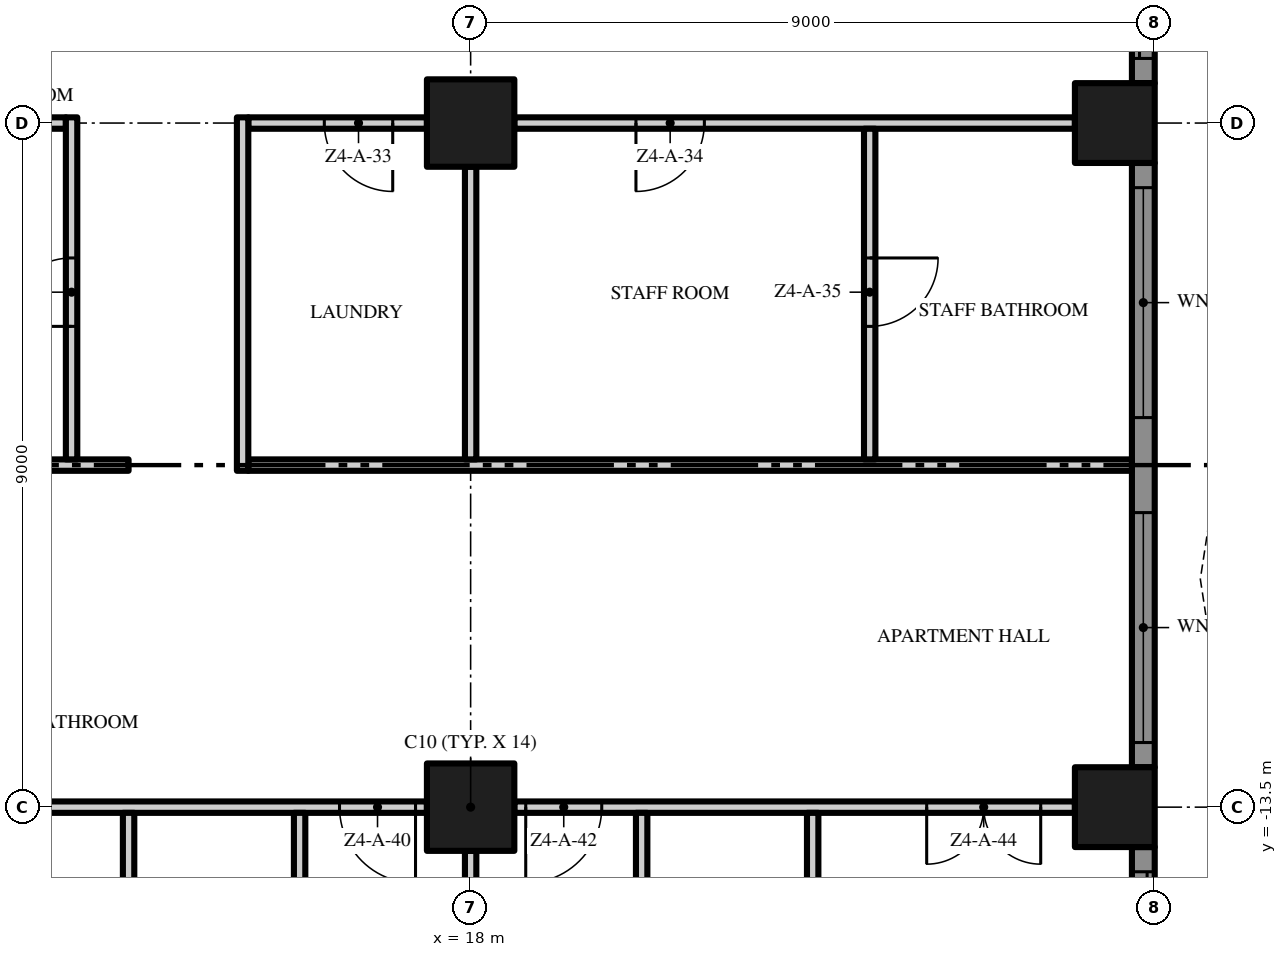
"""IFC4 building model, lengths in metres.
Left out: names, types, materials, properties, quantities, classifications, styles, units other than length and angle.
Written with IfcOpenShell. Run it as: python <this file> out.ifc"""

import sys

from ifc_helpers import new_model, si_unit, direction, frame, frame_2d, origin, origin_2d, place, context, subcontext, project, spatial, polyline, rectangle, outline, extrude, element, fill, save


model = new_model("IFC4")
c1 = context("Model", 3, precision=1e-05, world=origin(), true_north=direction((0.0, 1.0)))
c2 = subcontext(c1, "Body", "Model", "MODEL_VIEW")
j1 = project(units=[si_unit("LENGTHUNIT", "METRE"), si_unit("PLANEANGLEUNIT", "RADIAN")], contexts=[c1])
p1 = place(None, origin())
s1 = spatial("IfcSite", under=j1, at=p1, CompositionType="ELEMENT")
p2 = place(p1, origin())
s2 = spatial("IfcBuilding", under=s1, at=p2, CompositionType="ELEMENT")
p3 = place(p2, frame((0.0, 0.0, 188.2)))
s3 = spatial("IfcBuildingStorey", under=s2, at=p3, CompositionType="ELEMENT", Elevation=188.2)
for number, where, z_axis, x_axis in (
    (1, (18.0, -13.5, 0.0), (0.0, 0.0, 1.0), (1.0, 0.0, 0.0)),
    (2, (18.0, -4.5, 0.0), (0.0, 0.0, 1.0), (1.0, 0.0, 0.0)),
):
    element("IfcColumn", number, at=place(p3, frame(where, z_axis=z_axis, x_axis=x_axis)), inside=s3, PredefinedType="COLUMN", context=c2, shape_type="SweptSolid", body=[
        extrude(rectangle(XDim=1.15, YDim=1.15, at=origin_2d()), origin(), (0.0, 0.0, 1.0), 3.5),
    ])
for number, where, z_axis, x_axis in (
    (3, (26.475, -13.5, 0.0), (0.0, 0.0, 1.0), (1.0, 0.0, 0.0)),
    (4, (26.475, -4.5, 0.0), (0.0, 0.0, 1.0), (1.0, 0.0, 0.0)),
):
    element("IfcColumn", number, at=place(p3, frame(where, z_axis=z_axis, x_axis=x_axis)), inside=s3, PredefinedType="COLUMN", context=c2, shape_type="SweptSolid", body=[
        extrude(rectangle(XDim=1.05, YDim=1.05, at=origin_2d()), origin(), (0.0, 0.0, 1.0), 3.5),
    ])
p4 = place(p3, frame((26.85, -14.025, 0.0), z_axis=(0.0, 0.0, 1.0), x_axis=(0.0, -1.0, 0.0)))
e5 = element("IfcWall", 5, at=p4, inside=s3, PredefinedType="SOLIDWALL", context=c2, shape_type="SweptSolid", body=[
    extrude(rectangle(XDim=3.675, YDim=0.3, at=frame_2d((1.837, 0.0))), origin(), (0.0, 0.0, 1.0), 3.5),
])
p5 = place(p4, frame((0.325, 0.0, 0.0)))
e6 = element("IfcOpeningElement", 6, at=p5, cuts=e5, PredefinedType="OPENING", context=c2, shape_type="SweptSolid", body=[
    extrude(rectangle(XDim=3.025, YDim=2.4, at=frame_2d((1.512, 1.2))), frame((0.0, 0.16, 0.0), z_axis=(0.0, -1.0, 0.0), x_axis=(1.0, 0.0, 0.0)), (0.0, 0.0, 1.0), 0.32),
])
p6 = place(p3, frame((26.85, -5.025, 0.0), z_axis=(0.0, 0.0, 1.0), x_axis=(0.0, -1.0, 0.0)))
e7 = element("IfcWall", 7, at=p6, inside=s3, PredefinedType="SOLIDWALL", context=c2, shape_type="SweptSolid", body=[
    extrude(rectangle(XDim=7.95, YDim=0.3, at=frame_2d((3.975, 0.0))), origin(), (0.0, 0.0, 1.0), 3.5),
])
p7 = place(p6, frame((4.6, 0.0, 0.45)))
e8 = element("IfcOpeningElement", 8, at=p7, cuts=e7, PredefinedType="OPENING", context=c2, shape_type="SweptSolid", body=[
    extrude(rectangle(XDim=3.025, YDim=2.65, at=frame_2d((1.512, 1.325))), frame((0.0, 0.16, 0.0), z_axis=(0.0, -1.0, 0.0), x_axis=(1.0, 0.0, 0.0)), (0.0, 0.0, 1.0), 0.32),
])
p8 = place(p6, frame((0.325, 0.0, 0.45)))
e9 = element("IfcOpeningElement", 9, at=p8, cuts=e7, PredefinedType="OPENING", context=c2, shape_type="SweptSolid", body=[
    extrude(rectangle(XDim=3.025, YDim=2.65, at=frame_2d((1.512, 1.325))), frame((0.0, 0.16, 0.0), z_axis=(0.0, -1.0, 0.0), x_axis=(1.0, 0.0, 0.0)), (0.0, 0.0, 1.0), 0.32),
])
p9 = place(p3, frame((26.85, 3.975, 0.0), z_axis=(0.0, 0.0, 1.0), x_axis=(0.0, -1.0, 0.0)))
e10 = element("IfcWall", 10, at=p9, inside=s3, PredefinedType="SOLIDWALL", context=c2, shape_type="SweptSolid", body=[
    extrude(rectangle(XDim=7.95, YDim=0.3, at=frame_2d((3.975, 0.0))), origin(), (0.0, 0.0, 1.0), 3.5),
])
p10 = place(p9, frame((4.6, 0.0, 0.0)))
e11 = element("IfcOpeningElement", 11, at=p10, cuts=e10, PredefinedType="OPENING", context=c2, shape_type="SweptSolid", body=[
    extrude(rectangle(XDim=3.025, YDim=2.4, at=frame_2d((1.512, 1.2))), frame((0.0, 0.16, 0.0), z_axis=(0.0, -1.0, 0.0), x_axis=(1.0, 0.0, 0.0)), (0.0, 0.0, 1.0), 0.32),
])
p11 = place(p9, frame((0.325, 0.0, 0.45)))
e12 = element("IfcOpeningElement", 12, at=p11, cuts=e10, PredefinedType="OPENING", context=c2, shape_type="SweptSolid", body=[
    extrude(rectangle(XDim=3.025, YDim=2.65, at=frame_2d((1.512, 1.325))), frame((0.0, 0.16, 0.0), z_axis=(0.0, -1.0, 0.0), x_axis=(1.0, 0.0, 0.0)), (0.0, 0.0, 1.0), 0.32),
])
p12 = place(p3, origin())
e13 = element("IfcWall", 13, at=p12, inside=s3, PredefinedType="USERDEFINED", context=c2, shape_type="SweptSolid", body=[
    extrude(outline(polyline([(30.0, -18.0), (29.771, -16.5), (29.171, -15.0), (28.429, -13.5), (27.829, -12.0), (27.6, -10.5), (27.829, -9.0), (28.429, -7.5), (29.171, -6.0), (29.771, -4.5), (30.0, -3.0), (29.771, -1.5), (29.171, 0.0), (28.429, 1.5), (27.829, 3.0), (27.6, 4.5), (27.829, 6.0), (28.429, 7.5), (29.171, 9.0), (29.771, 10.5), (30.0, 12.0), (29.771, 13.5), (29.171, 15.0), (28.429, 16.5), (27.829, 18.0), (27.597, 17.907), (28.201, 16.398), (28.942, 14.898), (29.528, 13.434), (29.747, 12.0), (29.528, 10.566), (28.942, 9.102), (28.201, 7.602), (27.586, 6.066), (27.347, 4.5), (27.586, 2.934), (28.201, 1.398), (28.942, -0.102), (29.528, -1.566), (29.747, -3.0), (29.528, -4.434), (28.942, -5.898), (28.201, -7.398), (27.586, -8.934), (27.347, -10.5), (27.586, -12.066), (28.201, -13.602), (28.942, -15.102), (29.528, -16.566), (29.753, -18.038), (30.0, -18.0)])), origin(), (0.0, 0.0, 1.0), 0.9),
])
p13 = place(p3, frame((17.425, -13.5, 0.0), z_axis=(0.0, 0.0, 1.0), x_axis=(-1.0, 0.0, 0.0)))
e14 = element("IfcWall", 14, at=p13, inside=s3, PredefinedType="PARTITIONING", context=c2, shape_type="SweptSolid", body=[
    extrude(rectangle(XDim=7.85, YDim=0.15, at=frame_2d((3.925, 0.0))), origin(), (0.0, 0.0, 1.0), 3.5),
])
p14 = place(p13, frame((6.7, 0.0, 0.0)))
e15 = element("IfcOpeningElement", 15, at=p14, cuts=e14, PredefinedType="OPENING", context=c2, shape_type="SweptSolid", body=[
    extrude(rectangle(XDim=1.0, YDim=2.4, at=frame_2d((0.5, 1.2))), frame((0.0, 0.085, 0.0), z_axis=(0.0, -1.0, 0.0), x_axis=(1.0, 0.0, 0.0)), (0.0, 0.0, 1.0), 0.17),
])
p15 = place(p13, frame((0.15, 0.0, 0.0)))
e16 = element("IfcOpeningElement", 16, at=p15, cuts=e14, PredefinedType="OPENING", context=c2, shape_type="SweptSolid", body=[
    extrude(rectangle(XDim=1.0, YDim=2.4, at=frame_2d((0.5, 1.2))), frame((0.0, 0.085, 0.0), z_axis=(0.0, -1.0, 0.0), x_axis=(1.0, 0.0, 0.0)), (0.0, 0.0, 1.0), 0.17),
])
p16 = place(p3, frame((25.95, -13.5, 0.0), z_axis=(0.0, 0.0, 1.0), x_axis=(-1.0, 0.0, 0.0)))
e17 = element("IfcWall", 17, at=p16, inside=s3, PredefinedType="PARTITIONING", context=c2, shape_type="SweptSolid", body=[
    extrude(rectangle(XDim=7.375, YDim=0.15, at=frame_2d((3.688, 0.0))), origin(), (0.0, 0.0, 1.0), 3.5),
])
p17 = place(p16, frame((6.225, 0.0, 0.0)))
e18 = element("IfcOpeningElement", 18, at=p17, cuts=e17, PredefinedType="OPENING", context=c2, shape_type="SweptSolid", body=[
    extrude(rectangle(XDim=1.0, YDim=2.4, at=frame_2d((0.5, 1.2))), frame((0.0, 0.085, 0.0), z_axis=(0.0, -1.0, 0.0), x_axis=(1.0, 0.0, 0.0)), (0.0, 0.0, 1.0), 0.17),
])
p18 = place(p16, frame((0.45, 0.0, 0.0)))
e19 = element("IfcOpeningElement", 19, at=p18, cuts=e17, PredefinedType="OPENING", context=c2, shape_type="SweptSolid", body=[
    extrude(rectangle(XDim=1.5, YDim=2.4, at=frame_2d((0.75, 1.2))), frame((0.0, 0.085, 0.0), z_axis=(0.0, -1.0, 0.0), x_axis=(1.0, 0.0, 0.0)), (0.0, 0.0, 1.0), 0.17),
])
p19 = place(p3, frame((0.1, -9.0, 0.0), z_axis=(0.0, 0.0, 1.0), x_axis=(1.0, 0.0, 0.0)))
e20 = element("IfcWall", 20, at=p19, inside=s3, PredefinedType="PARTITIONING", context=c2, shape_type="SweptSolid", body=[
    extrude(rectangle(XDim=13.4, YDim=0.15, at=frame_2d((6.7, 0.0))), origin(), (0.0, 0.0, 1.0), 3.5),
])
p20 = place(p19, frame((6.9, 0.0, 0.0)))
e21 = element("IfcOpeningElement", 21, at=p20, cuts=e20, PredefinedType="OPENING", context=c2, shape_type="SweptSolid", body=[
    extrude(rectangle(XDim=1.0, YDim=2.4, at=frame_2d((0.5, 1.2))), frame((0.0, 0.085, 0.0), z_axis=(0.0, -1.0, 0.0), x_axis=(1.0, 0.0, 0.0)), (0.0, 0.0, 1.0), 0.17),
])
p21 = place(p3, frame((15.075, -9.0, 0.0), z_axis=(0.0, 0.0, 1.0), x_axis=(1.0, 0.0, 0.0)))
e22 = element("IfcWall", 22, at=p21, inside=s3, PredefinedType="PARTITIONING", context=c2, shape_type="SweptSolid", body=[
    extrude(rectangle(XDim=11.625, YDim=0.15, at=frame_2d((5.812, 0.0))), origin(), (0.0, 0.0, 1.0), 3.5),
])
p22 = place(p3, frame((9.575, -4.5, 0.0), z_axis=(0.0, 0.0, 1.0), x_axis=(1.0, 0.0, 0.0)))
e23 = element("IfcWall", 23, at=p22, inside=s3, PredefinedType="PARTITIONING", context=c2, shape_type="SweptSolid", body=[
    extrude(rectangle(XDim=3.1, YDim=0.15, at=frame_2d((1.55, 0.0))), origin(), (0.0, 0.0, 1.0), 3.5),
])
p23 = place(p3, frame((17.425, -4.5, 0.0), z_axis=(0.0, 0.0, 1.0), x_axis=(-1.0, 0.0, 0.0)))
e24 = element("IfcWall", 24, at=p23, inside=s3, PredefinedType="PARTITIONING", context=c2, shape_type="SweptSolid", body=[
    extrude(rectangle(XDim=2.35, YDim=0.15, at=frame_2d((1.175, 0.0))), origin(), (0.0, 0.0, 1.0), 3.5),
])
p24 = place(p23, frame((0.45, 0.0, 0.0)))
e25 = element("IfcOpeningElement", 25, at=p24, cuts=e24, PredefinedType="OPENING", context=c2, shape_type="SweptSolid", body=[
    extrude(rectangle(XDim=0.9, YDim=2.1, at=frame_2d((0.45, 1.05))), frame((0.0, 0.085, 0.0), z_axis=(0.0, -1.0, 0.0), x_axis=(1.0, 0.0, 0.0)), (0.0, 0.0, 1.0), 0.17),
])
p25 = place(p3, frame((25.95, -4.5, 0.0), z_axis=(0.0, 0.0, 1.0), x_axis=(-1.0, 0.0, 0.0)))
e26 = element("IfcWall", 26, at=p25, inside=s3, PredefinedType="PARTITIONING", context=c2, shape_type="SweptSolid", body=[
    extrude(rectangle(XDim=7.375, YDim=0.15, at=frame_2d((3.688, 0.0))), origin(), (0.0, 0.0, 1.0), 3.5),
])
p26 = place(p25, frame((4.875, 0.0, 0.0)))
e27 = element("IfcOpeningElement", 27, at=p26, cuts=e26, PredefinedType="OPENING", context=c2, shape_type="SweptSolid", body=[
    extrude(rectangle(XDim=0.9, YDim=2.1, at=frame_2d((0.45, 1.05))), frame((0.0, 0.085, 0.0), z_axis=(0.0, -1.0, 0.0), x_axis=(1.0, 0.0, 0.0)), (0.0, 0.0, 1.0), 0.17),
])
p27 = place(p3, frame((12.75, -8.925, 0.0), z_axis=(0.0, 0.0, 1.0), x_axis=(0.0, 1.0, 0.0)))
e28 = element("IfcWall", 28, at=p27, inside=s3, PredefinedType="PARTITIONING", context=c2, shape_type="SweptSolid", body=[
    extrude(rectangle(XDim=4.5, YDim=0.15, at=frame_2d((2.25, 0.0))), origin(), (0.0, 0.0, 1.0), 3.5),
])
p28 = place(p27, frame((1.75, 0.0, 0.0)))
e29 = element("IfcOpeningElement", 29, at=p28, cuts=e28, PredefinedType="OPENING", context=c2, shape_type="SweptSolid", body=[
    extrude(rectangle(XDim=0.9, YDim=2.1, at=frame_2d((0.45, 1.05))), frame((0.0, 0.085, 0.0), z_axis=(0.0, -1.0, 0.0), x_axis=(1.0, 0.0, 0.0)), (0.0, 0.0, 1.0), 0.17),
])
p29 = place(p3, frame((13.5, -22.2, 0.0), z_axis=(0.0, 0.0, 1.0), x_axis=(0.0, 1.0, 0.0)))
e30 = element("IfcWall", 30, at=p29, inside=s3, PredefinedType="PARTITIONING", context=c2, shape_type="SweptSolid", body=[
    extrude(rectangle(XDim=8.625, YDim=0.15, at=frame_2d((4.312, 0.0))), origin(), (0.0, 0.0, 1.0), 3.5),
])
p30 = place(p3, frame((15.0, -9.075, 0.0), z_axis=(0.0, 0.0, 1.0), x_axis=(0.0, 1.0, 0.0)))
e31 = element("IfcWall", 31, at=p30, inside=s3, PredefinedType="PARTITIONING", context=c2, shape_type="SweptSolid", body=[
    extrude(rectangle(XDim=4.65, YDim=0.15, at=frame_2d((2.325, 0.0))), origin(), (0.0, 0.0, 1.0), 3.5),
])
p31 = place(p3, frame((15.75, -16.575, 0.0), z_axis=(0.0, 0.0, 1.0), x_axis=(0.0, 1.0, 0.0)))
e32 = element("IfcWall", 32, at=p31, inside=s3, PredefinedType="PARTITIONING", context=c2, shape_type="SweptSolid", body=[
    extrude(rectangle(XDim=3.0, YDim=0.15, at=frame_2d((1.5, 0.0))), origin(), (0.0, 0.0, 1.0), 3.5),
])
p32 = place(p3, frame((18.0, -21.45, 0.0), z_axis=(0.0, 0.0, 1.0), x_axis=(0.0, 1.0, 0.0)))
e33 = element("IfcWall", 33, at=p32, inside=s3, PredefinedType="PARTITIONING", context=c2, shape_type="SweptSolid", body=[
    extrude(rectangle(XDim=7.375, YDim=0.15, at=frame_2d((3.688, 0.0))), origin(), (0.0, 0.0, 1.0), 3.5),
])
p33 = place(p3, frame((18.0, -8.925, 0.0), z_axis=(0.0, 0.0, 1.0), x_axis=(0.0, 1.0, 0.0)))
e34 = element("IfcWall", 34, at=p33, inside=s3, PredefinedType="PARTITIONING", context=c2, shape_type="SweptSolid", body=[
    extrude(rectangle(XDim=3.85, YDim=0.15, at=frame_2d((1.925, 0.0))), origin(), (0.0, 0.0, 1.0), 3.5),
])
p34 = place(p3, frame((20.25, -16.575, 0.0), z_axis=(0.0, 0.0, 1.0), x_axis=(0.0, 1.0, 0.0)))
e35 = element("IfcWall", 35, at=p34, inside=s3, PredefinedType="PARTITIONING", context=c2, shape_type="SweptSolid", body=[
    extrude(rectangle(XDim=3.0, YDim=0.15, at=frame_2d((1.5, 0.0))), origin(), (0.0, 0.0, 1.0), 3.5),
])
p35 = place(p3, frame((22.5, -17.475, 0.0), z_axis=(0.0, 0.0, 1.0), x_axis=(0.0, 1.0, 0.0)))
e36 = element("IfcWall", 36, at=p35, inside=s3, PredefinedType="PARTITIONING", context=c2, shape_type="SweptSolid", body=[
    extrude(rectangle(XDim=3.9, YDim=0.15, at=frame_2d((1.95, 0.0))), origin(), (0.0, 0.0, 1.0), 3.5),
])
p36 = place(p3, frame((23.25, -4.575, 0.0), z_axis=(0.0, 0.0, 1.0), x_axis=(0.0, -1.0, 0.0)))
e37 = element("IfcWall", 37, at=p36, inside=s3, PredefinedType="PARTITIONING", context=c2, shape_type="SweptSolid", body=[
    extrude(rectangle(XDim=4.35, YDim=0.15, at=frame_2d((2.175, 0.0))), origin(), (0.0, 0.0, 1.0), 3.5),
])
p37 = place(p36, frame((1.7, 0.0, 0.0)))
e38 = element("IfcOpeningElement", 38, at=p37, cuts=e37, PredefinedType="OPENING", context=c2, shape_type="SweptSolid", body=[
    extrude(rectangle(XDim=0.9, YDim=2.1, at=frame_2d((0.45, 1.05))), frame((0.0, 0.085, 0.0), z_axis=(0.0, -1.0, 0.0), x_axis=(1.0, 0.0, 0.0)), (0.0, 0.0, 1.0), 0.17),
])
p38 = place(p5, origin())
e39 = element("IfcDoor", 39, at=p38, inside=s3, OperationType="SINGLE_SWING_LEFT", PredefinedType="DOOR", context=c2, shape_type="SweptSolid", body=[
    extrude(rectangle(XDim=3.025, YDim=2.4, at=frame_2d((1.512, 1.2))), frame((0.0, 0.025, 0.0), z_axis=(0.0, -1.0, 0.0), x_axis=(1.0, 0.0, 0.0)), (0.0, 0.0, 1.0), 0.05),
])
fill(e6, e39)
p39 = place(p7, origin())
e40 = element("IfcWindow", 40, at=p39, inside=s3, PartitioningType="SINGLE_PANEL", PredefinedType="WINDOW", context=c2, shape_type="SweptSolid", body=[
    extrude(rectangle(XDim=3.025, YDim=2.65, at=frame_2d((1.512, 1.325))), frame((0.0, 0.03, 0.0), z_axis=(0.0, -1.0, 0.0), x_axis=(1.0, 0.0, 0.0)), (0.0, 0.0, 1.0), 0.06),
])
fill(e8, e40)
p40 = place(p8, origin())
e41 = element("IfcWindow", 41, at=p40, inside=s3, PartitioningType="SINGLE_PANEL", PredefinedType="WINDOW", context=c2, shape_type="SweptSolid", body=[
    extrude(rectangle(XDim=3.025, YDim=2.65, at=frame_2d((1.512, 1.325))), frame((0.0, 0.03, 0.0), z_axis=(0.0, -1.0, 0.0), x_axis=(1.0, 0.0, 0.0)), (0.0, 0.0, 1.0), 0.06),
])
fill(e9, e41)
p41 = place(p10, origin())
e42 = element("IfcDoor", 42, at=p41, inside=s3, OperationType="SINGLE_SWING_LEFT", PredefinedType="DOOR", context=c2, shape_type="SweptSolid", body=[
    extrude(rectangle(XDim=3.025, YDim=2.4, at=frame_2d((1.512, 1.2))), frame((0.0, 0.025, 0.0), z_axis=(0.0, -1.0, 0.0), x_axis=(1.0, 0.0, 0.0)), (0.0, 0.0, 1.0), 0.05),
])
fill(e11, e42)
p42 = place(p28, origin())
e43 = element("IfcDoor", 43, at=p42, inside=s3, OperationType="SINGLE_SWING_LEFT", PredefinedType="DOOR", context=c2, shape_type="SweptSolid", body=[
    extrude(rectangle(XDim=0.9, YDim=2.1, at=frame_2d((0.45, 1.05))), frame((0.0, 0.025, 0.0), z_axis=(0.0, -1.0, 0.0), x_axis=(1.0, 0.0, 0.0)), (0.0, 0.0, 1.0), 0.05),
])
fill(e29, e43)
p43 = place(p24, origin())
e44 = element("IfcDoor", 44, at=p43, inside=s3, OperationType="SINGLE_SWING_LEFT", PredefinedType="DOOR", context=c2, shape_type="SweptSolid", body=[
    extrude(rectangle(XDim=0.9, YDim=2.1, at=frame_2d((0.45, 1.05))), frame((0.0, 0.025, 0.0), z_axis=(0.0, -1.0, 0.0), x_axis=(1.0, 0.0, 0.0)), (0.0, 0.0, 1.0), 0.05),
])
fill(e25, e44)
p44 = place(p26, origin())
e45 = element("IfcDoor", 45, at=p44, inside=s3, OperationType="SINGLE_SWING_RIGHT", PredefinedType="DOOR", context=c2, shape_type="SweptSolid", body=[
    extrude(rectangle(XDim=0.9, YDim=2.1, at=frame_2d((0.45, 1.05))), frame((0.0, 0.025, 0.0), z_axis=(0.0, -1.0, 0.0), x_axis=(1.0, 0.0, 0.0)), (0.0, 0.0, 1.0), 0.05),
])
fill(e27, e45)
p45 = place(p37, origin())
e46 = element("IfcDoor", 46, at=p45, inside=s3, OperationType="SINGLE_SWING_LEFT", PredefinedType="DOOR", context=c2, shape_type="SweptSolid", body=[
    extrude(rectangle(XDim=0.9, YDim=2.1, at=frame_2d((0.45, 1.05))), frame((0.0, 0.025, 0.0), z_axis=(0.0, -1.0, 0.0), x_axis=(1.0, 0.0, 0.0)), (0.0, 0.0, 1.0), 0.05),
])
fill(e38, e46)
p46 = place(p15, origin())
e47 = element("IfcDoor", 47, at=p46, inside=s3, OperationType="SINGLE_SWING_LEFT", PredefinedType="DOOR", context=c2, shape_type="SweptSolid", body=[
    extrude(rectangle(XDim=1.0, YDim=2.4, at=frame_2d((0.5, 1.2))), frame((0.0, 0.025, 0.0), z_axis=(0.0, -1.0, 0.0), x_axis=(1.0, 0.0, 0.0)), (0.0, 0.0, 1.0), 0.05),
])
fill(e16, e47)
p47 = place(p17, origin())
e48 = element("IfcDoor", 48, at=p47, inside=s3, OperationType="SINGLE_SWING_RIGHT", PredefinedType="DOOR", context=c2, shape_type="SweptSolid", body=[
    extrude(rectangle(XDim=1.0, YDim=2.4, at=frame_2d((0.5, 1.2))), frame((0.0, 0.025, 0.0), z_axis=(0.0, -1.0, 0.0), x_axis=(1.0, 0.0, 0.0)), (0.0, 0.0, 1.0), 0.05),
])
fill(e18, e48)
p48 = place(p18, origin())
e49 = element("IfcDoor", 49, at=p48, inside=s3, OperationType="DOUBLE_DOOR_SINGLE_SWING", PredefinedType="DOOR", context=c2, shape_type="SweptSolid", body=[
    extrude(rectangle(XDim=1.5, YDim=2.4, at=frame_2d((0.75, 1.2))), frame((0.0, 0.025, 0.0), z_axis=(0.0, -1.0, 0.0), x_axis=(1.0, 0.0, 0.0)), (0.0, 0.0, 1.0), 0.05),
])
fill(e19, e49)
save(model, sys.argv[1])
